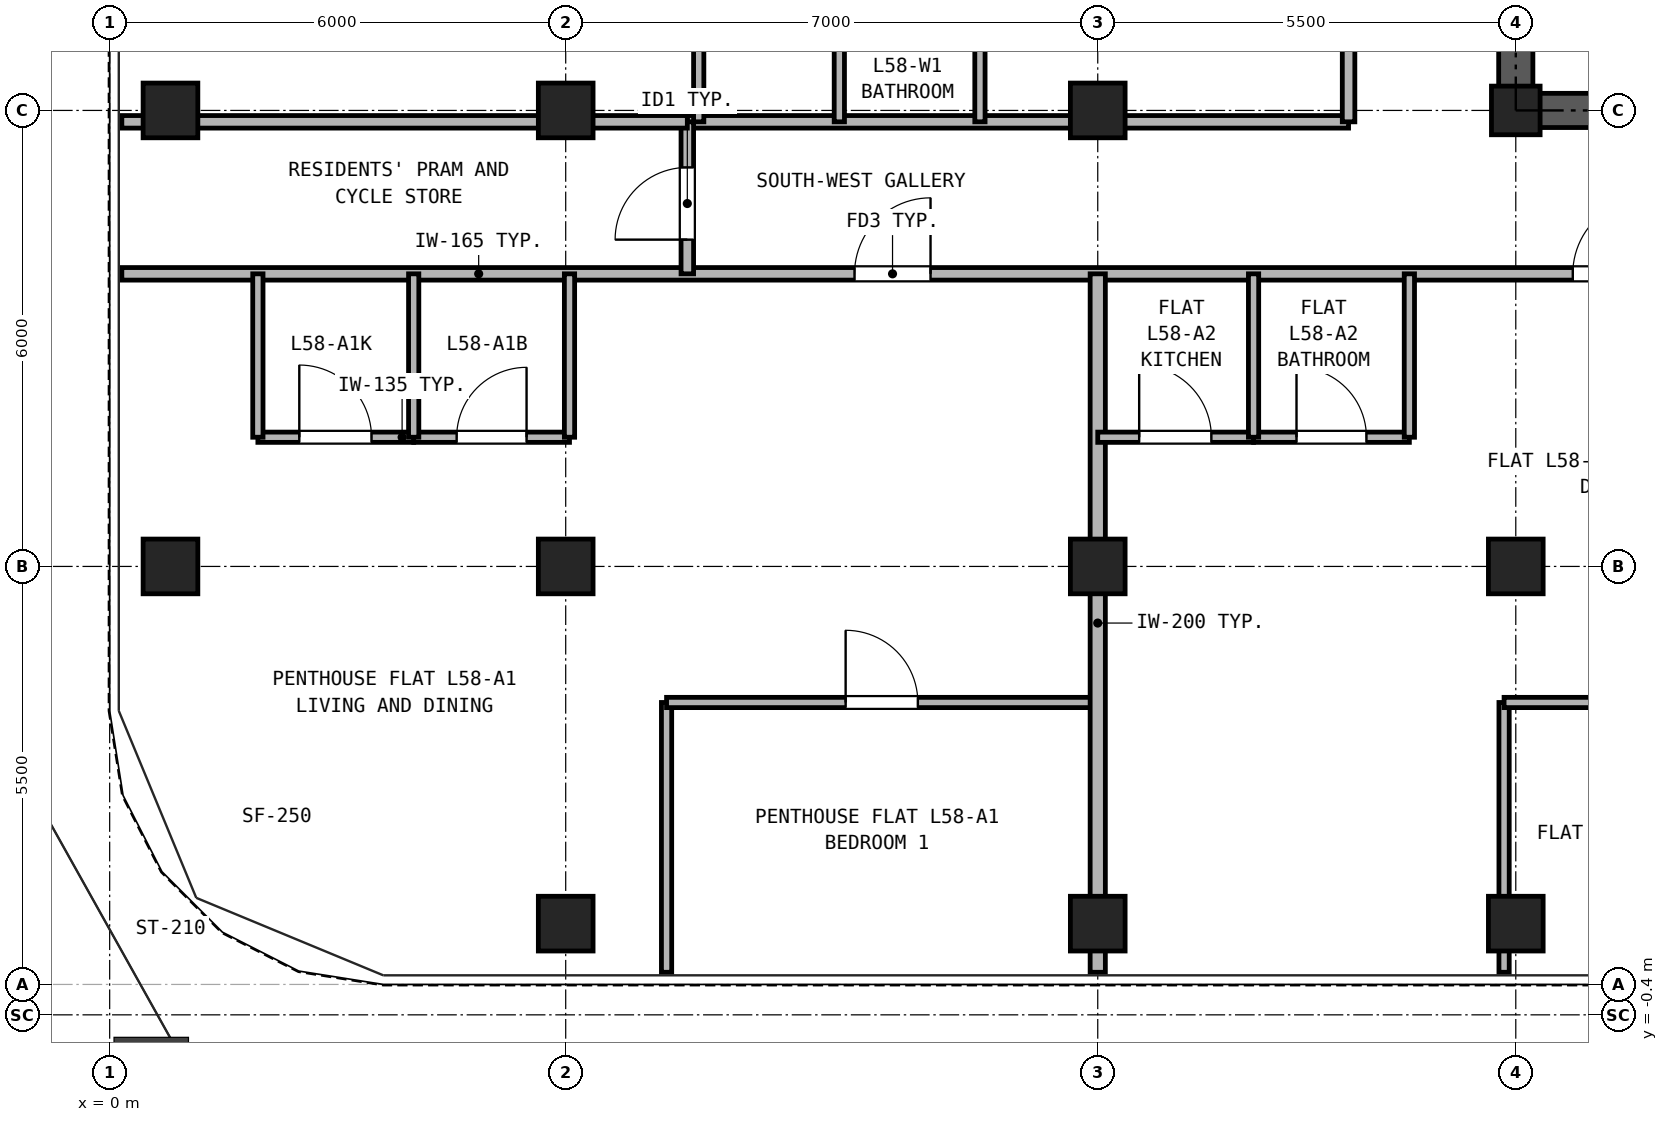
"""IFC4 building model, lengths in metres.
Left out: names, types, materials, properties, quantities, classifications, styles, units other than length and angle.
Written with IfcOpenShell. Run it as: python <this file> out.ifc"""

import sys

from ifc_helpers import new_model, si_unit, direction, frame, frame_2d, origin, origin_2d, place, context, subcontext, project, spatial, rectangle, hollow_rectangle, extrude, source, transform, mapped, element, fill, save


model = new_model("IFC4")
c1 = context("Model", 3, precision=1e-05, world=origin(), true_north=direction((0.0, 1.0)))
c2 = subcontext(c1, "Body", "Model", "MODEL_VIEW")
j1 = project(units=[si_unit("LENGTHUNIT", "METRE"), si_unit("PLANEANGLEUNIT", "RADIAN")], contexts=[c1])
p1 = place(None, origin())
s1 = spatial("IfcSite", under=j1, at=p1, CompositionType="ELEMENT")
p2 = place(p1, origin())
s2 = spatial("IfcBuilding", under=s1, at=p2, CompositionType="ELEMENT")
p3 = place(p2, frame((0.0, 0.0, 206.0)))
s3 = spatial("IfcBuildingStorey", under=s2, at=p3, CompositionType="ELEMENT", Elevation=206.0)
m1 = source(origin(), c2, "Body", "SweptSolid", [
    extrude(hollow_rectangle(XDim=0.72, YDim=0.72, WallThickness=0.04, at=origin_2d()), origin(), (0.0, 0.0, 1.0), 2.95),
])
for number, where, z_axis, x_axis in (
    (1, (6.0, 0.8, 0.0), (0.0, 0.0, 1.0), (1.0, 0.0, 0.0)),
    (2, (13.0, 0.8, 0.0), (0.0, 0.0, 1.0), (1.0, 0.0, 0.0)),
    (3, (18.5, 0.8, 0.0), (0.0, 0.0, 1.0), (1.0, 0.0, 0.0)),
    (4, (0.8, 5.5, 0.0), (0.0, 0.0, 1.0), (1.0, 0.0, 0.0)),
    (5, (0.8, 11.5, 0.0), (0.0, 0.0, 1.0), (1.0, 0.0, 0.0)),
    (6, (6.0, 5.5, 0.0), (0.0, 0.0, 1.0), (1.0, 0.0, 0.0)),
    (7, (6.0, 11.5, 0.0), (0.0, 0.0, 1.0), (1.0, 0.0, 0.0)),
    (8, (13.0, 5.5, 0.0), (0.0, 0.0, 1.0), (1.0, 0.0, 0.0)),
    (9, (13.0, 11.5, 0.0), (0.0, 0.0, 1.0), (1.0, 0.0, 0.0)),
    (10, (18.5, 5.5, 0.0), (0.0, 0.0, 1.0), (1.0, 0.0, 0.0)),
):
    element("IfcColumn", number, at=place(p3, frame(where, z_axis=z_axis, x_axis=x_axis)), inside=s3, PredefinedType="COLUMN", context=c2, shape_type="MappedRepresentation", body=[
        mapped(m1, transform((0.0, 0.0, 0.0), x_axis=(1.0, 0.0, 0.0), y_axis=(0.0, 1.0, 0.0), z_axis=(0.0, 0.0, 1.0), scale=1.0)),
    ])
m2 = source(origin(), c2, "Body", "SweptSolid", [
    extrude(hollow_rectangle(XDim=0.64, YDim=0.64, WallThickness=0.035, at=origin_2d()), origin(), (0.0, 0.0, 1.0), 2.95),
])
p4 = place(p3, frame((18.5, 11.5, 0.0), z_axis=(0.0, 0.0, 1.0), x_axis=(1.0, 0.0, 0.0)))
e11 = element("IfcColumn", 11, at=p4, inside=s3, PredefinedType="COLUMN", context=c2, shape_type="MappedRepresentation", body=[
    mapped(m2, transform((0.0, 0.0, 0.0), x_axis=(1.0, 0.0, 0.0), y_axis=(0.0, 1.0, 0.0), z_axis=(0.0, 0.0, 1.0), scale=1.0)),
])
p5 = place(p3, frame((18.275, 11.5, 0.0), z_axis=(0.0, 0.0, 1.0), x_axis=(1.0, 0.0, 0.0)))
e12 = element("IfcWall", 12, at=p5, inside=s3, PredefinedType="SHEAR", context=c2, shape_type="SweptSolid", body=[
    extrude(rectangle(XDim=10.45, YDim=0.45, at=frame_2d((5.225, 0.0))), origin(), (0.0, 0.0, 1.0), 2.95),
])
p6 = place(p5, frame((1.825, 0.0, 0.0)))
e13 = element("IfcOpeningElement", 13, at=p6, cuts=e12, PredefinedType="OPENING", context=c2, shape_type="SweptSolid", body=[
    extrude(rectangle(XDim=0.95, YDim=2.15, at=frame_2d((0.475, 1.075))), frame((0.0, 0.235, 0.0), z_axis=(0.0, -1.0, 0.0), x_axis=(1.0, 0.0, 0.0)), (0.0, 0.0, 1.0), 0.47),
])
p7 = place(p5, frame((5.325, 0.0, 0.0)))
e14 = element("IfcOpeningElement", 14, at=p7, cuts=e12, PredefinedType="OPENING", context=c2, shape_type="SweptSolid", body=[
    extrude(rectangle(XDim=0.95, YDim=2.15, at=frame_2d((0.475, 1.075))), frame((0.0, 0.235, 0.0), z_axis=(0.0, -1.0, 0.0), x_axis=(1.0, 0.0, 0.0)), (0.0, 0.0, 1.0), 0.47),
])
p8 = place(p5, frame((8.225, 0.0, 0.0)))
e15 = element("IfcOpeningElement", 15, at=p8, cuts=e12, PredefinedType="OPENING", context=c2, shape_type="SweptSolid", body=[
    extrude(rectangle(XDim=1.1, YDim=2.25, at=frame_2d((0.55, 1.125))), frame((0.0, 0.235, 0.0), z_axis=(0.0, -1.0, 0.0), x_axis=(1.0, 0.0, 0.0)), (0.0, 0.0, 1.0), 0.47),
])
p9 = place(p3, frame((18.5, 11.725, 0.0), z_axis=(0.0, 0.0, 1.0), x_axis=(0.0, 1.0, 0.0)))
e16 = element("IfcWall", 16, at=p9, inside=s3, PredefinedType="SHEAR", context=c2, shape_type="SweptSolid", body=[
    extrude(rectangle(XDim=16.8, YDim=0.45, at=frame_2d((8.4, 0.0))), origin(), (0.0, 0.0, 1.0), 2.95),
])
p10 = place(p9, frame((7.425, 0.0, 0.0)))
e17 = element("IfcOpeningElement", 17, at=p10, cuts=e16, PredefinedType="OPENING", context=c2, shape_type="SweptSolid", body=[
    extrude(rectangle(XDim=1.15, YDim=2.2, at=frame_2d((0.575, 1.1))), frame((0.0, 0.235, 0.0), z_axis=(0.0, -1.0, 0.0), x_axis=(1.0, 0.0, 0.0)), (0.0, 0.0, 1.0), 0.47),
])
p11 = place(p3, frame((0.16, 9.35, 0.0), z_axis=(0.0, 0.0, 1.0), x_axis=(1.0, 0.0, 0.0)))
e18 = element("IfcWall", 18, at=p11, inside=s3, PredefinedType="PARTITIONING", context=c2, shape_type="SweptSolid", body=[
    extrude(rectangle(XDim=41.48, YDim=0.165, at=frame_2d((20.74, 0.0))), origin(), (0.0, 0.0, 1.0), 2.95),
])
p12 = place(p11, frame((9.64, 0.0, 0.0)))
e19 = element("IfcOpeningElement", 19, at=p12, cuts=e18, PredefinedType="OPENING", context=c2, shape_type="SweptSolid", body=[
    extrude(rectangle(XDim=1.0, YDim=2.15, at=frame_2d((0.5, 1.075))), frame((0.0, 0.093, 0.0), z_axis=(0.0, -1.0, 0.0), x_axis=(1.0, 0.0, 0.0)), (0.0, 0.0, 1.0), 0.185),
])
p13 = place(p11, frame((19.09, 0.0, 0.0)))
e20 = element("IfcOpeningElement", 20, at=p13, cuts=e18, PredefinedType="OPENING", context=c2, shape_type="SweptSolid", body=[
    extrude(rectangle(XDim=1.0, YDim=2.15, at=frame_2d((0.5, 1.075))), frame((0.0, 0.093, 0.0), z_axis=(0.0, -1.0, 0.0), x_axis=(1.0, 0.0, 0.0)), (0.0, 0.0, 1.0), 0.185),
])
p14 = place(p11, frame((28.34, 0.0, 0.0)))
e21 = element("IfcOpeningElement", 21, at=p14, cuts=e18, PredefinedType="OPENING", context=c2, shape_type="SweptSolid", body=[
    extrude(rectangle(XDim=1.0, YDim=2.15, at=frame_2d((0.5, 1.075))), frame((0.0, 0.093, 0.0), z_axis=(0.0, -1.0, 0.0), x_axis=(1.0, 0.0, 0.0)), (0.0, 0.0, 1.0), 0.185),
])
p15 = place(p11, frame((32.865, 0.0, 0.0)))
e22 = element("IfcOpeningElement", 22, at=p15, cuts=e18, PredefinedType="OPENING", context=c2, shape_type="SweptSolid", body=[
    extrude(rectangle(XDim=1.0, YDim=2.15, at=frame_2d((0.5, 1.075))), frame((0.0, 0.093, 0.0), z_axis=(0.0, -1.0, 0.0), x_axis=(1.0, 0.0, 0.0)), (0.0, 0.0, 1.0), 0.185),
])
p16 = place(p3, frame((7.6, 11.35, 0.0), z_axis=(0.0, 0.0, 1.0), x_axis=(1.0, 0.0, 0.0)))
e23 = element("IfcWall", 23, at=p16, inside=s3, PredefinedType="PARTITIONING", context=c2, shape_type="SweptSolid", body=[
    extrude(rectangle(XDim=8.7, YDim=0.165, at=frame_2d((4.35, 0.0))), origin(), (0.0, 0.0, 1.0), 2.323),
])
p17 = place(p3, frame((7.6, 9.35, 0.0), z_axis=(0.0, 0.0, 1.0), x_axis=(0.0, 1.0, 0.0)))
e24 = element("IfcWall", 24, at=p17, inside=s3, PredefinedType="PARTITIONING", context=c2, shape_type="SweptSolid", body=[
    extrude(rectangle(XDim=2.0, YDim=0.165, at=frame_2d((1.0, 0.0))), origin(), (0.0, 0.0, 1.0), 2.95),
])
p18 = place(p17, frame((0.45, 0.0, 0.0)))
e25 = element("IfcOpeningElement", 25, at=p18, cuts=e24, PredefinedType="OPENING", context=c2, shape_type="SweptSolid", body=[
    extrude(rectangle(XDim=0.95, YDim=2.15, at=frame_2d((0.475, 1.075))), frame((0.0, 0.093, 0.0), z_axis=(0.0, -1.0, 0.0), x_axis=(1.0, 0.0, 0.0)), (0.0, 0.0, 1.0), 0.185),
])
p19 = place(p3, frame((16.3, 11.35, 0.0), z_axis=(0.0, 0.0, 1.0), x_axis=(0.0, 1.0, 0.0)))
e26 = element("IfcWall", 26, at=p19, inside=s3, PredefinedType="PARTITIONING", context=c2, shape_type="SweptSolid", body=[
    extrude(rectangle(XDim=23.79, YDim=0.165, at=frame_2d((11.895, 0.0))), origin(), (0.0, 0.0, 1.0), 2.95),
])
p20 = place(p19, frame((4.825, 0.0, 0.0)))
e27 = element("IfcOpeningElement", 27, at=p20, cuts=e26, PredefinedType="OPENING", context=c2, shape_type="SweptSolid", body=[
    extrude(rectangle(XDim=1.0, YDim=2.15, at=frame_2d((0.5, 1.075))), frame((0.0, 0.093, 0.0), z_axis=(0.0, -1.0, 0.0), x_axis=(1.0, 0.0, 0.0)), (0.0, 0.0, 1.0), 0.185),
])
p21 = place(p19, frame((14.475, 0.0, 0.0)))
e28 = element("IfcOpeningElement", 28, at=p21, cuts=e26, PredefinedType="OPENING", context=c2, shape_type="SweptSolid", body=[
    extrude(rectangle(XDim=1.0, YDim=2.15, at=frame_2d((0.5, 1.075))), frame((0.0, 0.093, 0.0), z_axis=(0.0, -1.0, 0.0), x_axis=(1.0, 0.0, 0.0)), (0.0, 0.0, 1.0), 0.185),
])
p22 = place(p3, frame((1.95, 7.2, 0.0), z_axis=(0.0, 0.0, 1.0), x_axis=(1.0, 0.0, 0.0)))
e29 = element("IfcWall", 29, at=p22, inside=s3, PredefinedType="PARTITIONING", context=c2, shape_type="SweptSolid", body=[
    extrude(rectangle(XDim=2.05, YDim=0.135, at=frame_2d((1.025, 0.0))), origin(), (0.0, 0.0, 1.0), 2.95),
])
p23 = place(p22, frame((0.545, 0.0, 0.0)))
e30 = element("IfcOpeningElement", 30, at=p23, cuts=e29, PredefinedType="OPENING", context=c2, shape_type="SweptSolid", body=[
    extrude(rectangle(XDim=0.95, YDim=2.15, at=frame_2d((0.475, 1.075))), frame((0.0, 0.077, 0.0), z_axis=(0.0, -1.0, 0.0), x_axis=(1.0, 0.0, 0.0)), (0.0, 0.0, 1.0), 0.155),
])
p24 = place(p3, frame((4.0, 7.2, 0.0), z_axis=(0.0, 0.0, 1.0), x_axis=(1.0, 0.0, 0.0)))
e31 = element("IfcWall", 31, at=p24, inside=s3, PredefinedType="PARTITIONING", context=c2, shape_type="SweptSolid", body=[
    extrude(rectangle(XDim=2.05, YDim=0.135, at=frame_2d((1.025, 0.0))), origin(), (0.0, 0.0, 1.0), 2.95),
])
p25 = place(p24, frame((0.565, 0.0, 0.0)))
e32 = element("IfcOpeningElement", 32, at=p25, cuts=e31, PredefinedType="OPENING", context=c2, shape_type="SweptSolid", body=[
    extrude(rectangle(XDim=0.92, YDim=2.1, at=frame_2d((0.46, 1.05))), frame((0.0, 0.077, 0.0), z_axis=(0.0, -1.0, 0.0), x_axis=(1.0, 0.0, 0.0)), (0.0, 0.0, 1.0), 0.155),
])
for number, where, z_axis, x_axis in (
    (33, (1.95, 7.2, 0.0), (0.0, 0.0, 1.0), (0.0, 1.0, 0.0)),
    (34, (4.0, 7.2, 0.0), (0.0, 0.0, 1.0), (0.0, 1.0, 0.0)),
):
    element("IfcWall", number, at=place(p3, frame(where, z_axis=z_axis, x_axis=x_axis)), inside=s3, PredefinedType="PARTITIONING", context=c2, shape_type="SweptSolid", body=[
        extrude(rectangle(XDim=2.15, YDim=0.135, at=frame_2d((1.075, 0.0))), origin(), (0.0, 0.0, 1.0), 2.95),
    ])
p26 = place(p3, frame((6.05, 7.2, 0.0), z_axis=(0.0, 0.0, 1.0), x_axis=(0.0, 1.0, 0.0)))
e35 = element("IfcWall", 35, at=p26, inside=s3, PredefinedType="PARTITIONING", context=c2, shape_type="SweptSolid", body=[
    extrude(rectangle(XDim=2.15, YDim=0.135, at=frame_2d((1.075, 0.0))), origin(), (0.0, 0.0, 1.0), 2.323),
])
p27 = place(p3, frame((7.327, 0.16, 0.0), z_axis=(0.0, 0.0, 1.0), x_axis=(0.0, 1.0, 0.0)))
e36 = element("IfcWall", 36, at=p27, inside=s3, PredefinedType="PARTITIONING", context=c2, shape_type="SweptSolid", body=[
    extrude(rectangle(XDim=3.55, YDim=0.135, at=frame_2d((1.775, 0.0))), origin(), (0.0, 0.0, 1.0), 2.95),
])
p28 = place(p3, frame((7.327, 3.71, 0.0), z_axis=(0.0, 0.0, 1.0), x_axis=(1.0, 0.0, 0.0)))
e37 = element("IfcWall", 37, at=p28, inside=s3, PredefinedType="PARTITIONING", context=c2, shape_type="SweptSolid", body=[
    extrude(rectangle(XDim=5.673, YDim=0.135, at=frame_2d((2.836, 0.0))), origin(), (0.0, 0.0, 1.0), 2.95),
])
p29 = place(p28, frame((2.356, 0.0, 0.0)))
e38 = element("IfcOpeningElement", 38, at=p29, cuts=e37, PredefinedType="OPENING", context=c2, shape_type="SweptSolid", body=[
    extrude(rectangle(XDim=0.95, YDim=2.15, at=frame_2d((0.475, 1.075))), frame((0.0, 0.077, 0.0), z_axis=(0.0, -1.0, 0.0), x_axis=(1.0, 0.0, 0.0)), (0.0, 0.0, 1.0), 0.155),
])
p30 = place(p3, frame((13.0, 0.16, 0.0), z_axis=(0.0, 0.0, 1.0), x_axis=(0.0, 1.0, 0.0)))
e39 = element("IfcWall", 39, at=p30, inside=s3, PredefinedType="PARTITIONING", context=c2, shape_type="SweptSolid", body=[
    extrude(rectangle(XDim=9.19, YDim=0.2, at=frame_2d((4.595, 0.0))), origin(), (0.0, 0.0, 1.0), 2.323),
])
p31 = place(p3, frame((13.0, 7.2, 0.0), z_axis=(0.0, 0.0, 1.0), x_axis=(1.0, 0.0, 0.0)))
e40 = element("IfcWall", 40, at=p31, inside=s3, PredefinedType="PARTITIONING", context=c2, shape_type="SweptSolid", body=[
    extrude(rectangle(XDim=2.05, YDim=0.135, at=frame_2d((1.025, 0.0))), origin(), (0.0, 0.0, 1.0), 2.95),
])
p32 = place(p31, frame((0.545, 0.0, 0.0)))
e41 = element("IfcOpeningElement", 41, at=p32, cuts=e40, PredefinedType="OPENING", context=c2, shape_type="SweptSolid", body=[
    extrude(rectangle(XDim=0.95, YDim=2.15, at=frame_2d((0.475, 1.075))), frame((0.0, 0.077, 0.0), z_axis=(0.0, -1.0, 0.0), x_axis=(1.0, 0.0, 0.0)), (0.0, 0.0, 1.0), 0.155),
])
p33 = place(p3, frame((15.05, 7.2, 0.0), z_axis=(0.0, 0.0, 1.0), x_axis=(1.0, 0.0, 0.0)))
e42 = element("IfcWall", 42, at=p33, inside=s3, PredefinedType="PARTITIONING", context=c2, shape_type="SweptSolid", body=[
    extrude(rectangle(XDim=2.05, YDim=0.135, at=frame_2d((1.025, 0.0))), origin(), (0.0, 0.0, 1.0), 2.95),
])
p34 = place(p33, frame((0.565, 0.0, 0.0)))
e43 = element("IfcOpeningElement", 43, at=p34, cuts=e42, PredefinedType="OPENING", context=c2, shape_type="SweptSolid", body=[
    extrude(rectangle(XDim=0.92, YDim=2.1, at=frame_2d((0.46, 1.05))), frame((0.0, 0.077, 0.0), z_axis=(0.0, -1.0, 0.0), x_axis=(1.0, 0.0, 0.0)), (0.0, 0.0, 1.0), 0.155),
])
for number, where, z_axis, x_axis in (
    (44, (15.05, 7.2, 0.0), (0.0, 0.0, 1.0), (0.0, 1.0, 0.0)),
    (45, (17.1, 7.2, 0.0), (0.0, 0.0, 1.0), (0.0, 1.0, 0.0)),
):
    element("IfcWall", number, at=place(p3, frame(where, z_axis=z_axis, x_axis=x_axis)), inside=s3, PredefinedType="PARTITIONING", context=c2, shape_type="SweptSolid", body=[
        extrude(rectangle(XDim=2.15, YDim=0.135, at=frame_2d((1.075, 0.0))), origin(), (0.0, 0.0, 1.0), 2.95),
    ])
p35 = place(p3, frame((18.346, 0.16, 0.0), z_axis=(0.0, 0.0, 1.0), x_axis=(0.0, 1.0, 0.0)))
e46 = element("IfcWall", 46, at=p35, inside=s3, PredefinedType="PARTITIONING", context=c2, shape_type="SweptSolid", body=[
    extrude(rectangle(XDim=3.55, YDim=0.135, at=frame_2d((1.775, 0.0))), origin(), (0.0, 0.0, 1.0), 2.323),
])
p36 = place(p3, frame((18.346, 3.71, 0.0), z_axis=(0.0, 0.0, 1.0), x_axis=(1.0, 0.0, 0.0)))
e47 = element("IfcWall", 47, at=p36, inside=s3, PredefinedType="PARTITIONING", context=c2, shape_type="SweptSolid", body=[
    extrude(rectangle(XDim=4.154, YDim=0.135, at=frame_2d((2.077, 0.0))), origin(), (0.0, 0.0, 1.0), 2.95),
])
p37 = place(p36, frame((1.597, 0.0, 0.0)))
e48 = element("IfcOpeningElement", 48, at=p37, cuts=e47, PredefinedType="OPENING", context=c2, shape_type="SweptSolid", body=[
    extrude(rectangle(XDim=0.95, YDim=2.15, at=frame_2d((0.475, 1.075))), frame((0.0, 0.077, 0.0), z_axis=(0.0, -1.0, 0.0), x_axis=(1.0, 0.0, 0.0)), (0.0, 0.0, 1.0), 0.155),
])
p38 = place(p3, frame((0.16, 11.35, 0.0), z_axis=(0.0, 0.0, 1.0), x_axis=(1.0, 0.0, 0.0)))
e49 = element("IfcWall", 49, at=p38, inside=s3, PredefinedType="PARTITIONING", context=c2, shape_type="SweptSolid", body=[
    extrude(rectangle(XDim=7.44, YDim=0.165, at=frame_2d((3.72, 0.0))), origin(), (0.0, 0.0, 1.0), 2.323),
])
for number, where, z_axis, x_axis in (
    (50, (7.75, 11.35, 0.0), (0.0, 0.0, 1.0), (0.0, 1.0, 0.0)),
    (51, (9.6, 11.35, 0.0), (0.0, 0.0, 1.0), (0.0, 1.0, 0.0)),
    (52, (11.45, 11.35, 0.0), (0.0, 0.0, 1.0), (0.0, 1.0, 0.0)),
):
    element("IfcWall", number, at=place(p3, frame(where, z_axis=z_axis, x_axis=x_axis)), inside=s3, PredefinedType="PARTITIONING", context=c2, shape_type="SweptSolid", body=[
        extrude(rectangle(XDim=2.15, YDim=0.135, at=frame_2d((1.075, 0.0))), origin(), (0.0, 0.0, 1.0), 2.95),
    ])
p39 = place(p23, origin())
e53 = element("IfcDoor", 53, at=p39, inside=s3, OperationType="SINGLE_SWING_LEFT", PredefinedType="DOOR", context=c2, shape_type="SweptSolid", body=[
    extrude(rectangle(XDim=0.95, YDim=2.15, at=frame_2d((0.475, 1.075))), frame((0.0, 0.025, 0.0), z_axis=(0.0, -1.0, 0.0), x_axis=(1.0, 0.0, 0.0)), (0.0, 0.0, 1.0), 0.05),
])
fill(e30, e53)
p40 = place(p25, origin())
e54 = element("IfcDoor", 54, at=p40, inside=s3, OperationType="SINGLE_SWING_RIGHT", PredefinedType="DOOR", context=c2, shape_type="SweptSolid", body=[
    extrude(rectangle(XDim=0.92, YDim=2.1, at=frame_2d((0.46, 1.05))), frame((0.0, 0.025, 0.0), z_axis=(0.0, -1.0, 0.0), x_axis=(1.0, 0.0, 0.0)), (0.0, 0.0, 1.0), 0.05),
])
fill(e32, e54)
p41 = place(p29, frame((0.95, 0.0, 0.0), z_axis=(0.0, 0.0, 1.0), x_axis=(-1.0, 0.0, 0.0)))
e55 = element("IfcDoor", 55, at=p41, inside=s3, OperationType="SINGLE_SWING_LEFT", PredefinedType="DOOR", context=c2, shape_type="SweptSolid", body=[
    extrude(rectangle(XDim=0.95, YDim=2.15, at=frame_2d((0.475, 1.075))), frame((0.0, 0.025, 0.0), z_axis=(0.0, -1.0, 0.0), x_axis=(1.0, 0.0, 0.0)), (0.0, 0.0, 1.0), 0.05),
])
fill(e38, e55)
p42 = place(p12, frame((1.0, 0.0, 0.0), z_axis=(0.0, 0.0, 1.0), x_axis=(-1.0, 0.0, 0.0)))
e56 = element("IfcDoor", 56, at=p42, inside=s3, OperationType="SINGLE_SWING_RIGHT", PredefinedType="DOOR", context=c2, shape_type="SweptSolid", body=[
    extrude(rectangle(XDim=1.0, YDim=2.15, at=frame_2d((0.5, 1.075))), frame((0.0, 0.025, 0.0), z_axis=(0.0, -1.0, 0.0), x_axis=(1.0, 0.0, 0.0)), (0.0, 0.0, 1.0), 0.05),
])
fill(e19, e56)
p43 = place(p32, origin())
e57 = element("IfcDoor", 57, at=p43, inside=s3, OperationType="SINGLE_SWING_LEFT", PredefinedType="DOOR", context=c2, shape_type="SweptSolid", body=[
    extrude(rectangle(XDim=0.95, YDim=2.15, at=frame_2d((0.475, 1.075))), frame((0.0, 0.025, 0.0), z_axis=(0.0, -1.0, 0.0), x_axis=(1.0, 0.0, 0.0)), (0.0, 0.0, 1.0), 0.05),
])
fill(e41, e57)
p44 = place(p34, origin())
e58 = element("IfcDoor", 58, at=p44, inside=s3, OperationType="SINGLE_SWING_LEFT", PredefinedType="DOOR", context=c2, shape_type="SweptSolid", body=[
    extrude(rectangle(XDim=0.92, YDim=2.1, at=frame_2d((0.46, 1.05))), frame((0.0, 0.025, 0.0), z_axis=(0.0, -1.0, 0.0), x_axis=(1.0, 0.0, 0.0)), (0.0, 0.0, 1.0), 0.05),
])
fill(e43, e58)
p45 = place(p13, frame((1.0, 0.0, 0.0), z_axis=(0.0, 0.0, 1.0), x_axis=(-1.0, 0.0, 0.0)))
e59 = element("IfcDoor", 59, at=p45, inside=s3, OperationType="SINGLE_SWING_RIGHT", PredefinedType="DOOR", context=c2, shape_type="SweptSolid", body=[
    extrude(rectangle(XDim=1.0, YDim=2.15, at=frame_2d((0.5, 1.075))), frame((0.0, 0.025, 0.0), z_axis=(0.0, -1.0, 0.0), x_axis=(1.0, 0.0, 0.0)), (0.0, 0.0, 1.0), 0.05),
])
fill(e20, e59)
p46 = place(p18, frame((0.95, 0.0, 0.0), z_axis=(0.0, 0.0, 1.0), x_axis=(-1.0, 0.0, 0.0)))
e60 = element("IfcDoor", 60, at=p46, inside=s3, OperationType="SINGLE_SWING_LEFT", PredefinedType="DOOR", context=c2, shape_type="SweptSolid", body=[
    extrude(rectangle(XDim=0.95, YDim=2.15, at=frame_2d((0.475, 1.075))), frame((0.0, 0.025, 0.0), z_axis=(0.0, -1.0, 0.0), x_axis=(1.0, 0.0, 0.0)), (0.0, 0.0, 1.0), 0.05),
])
fill(e25, e60)
save(model, sys.argv[1])
